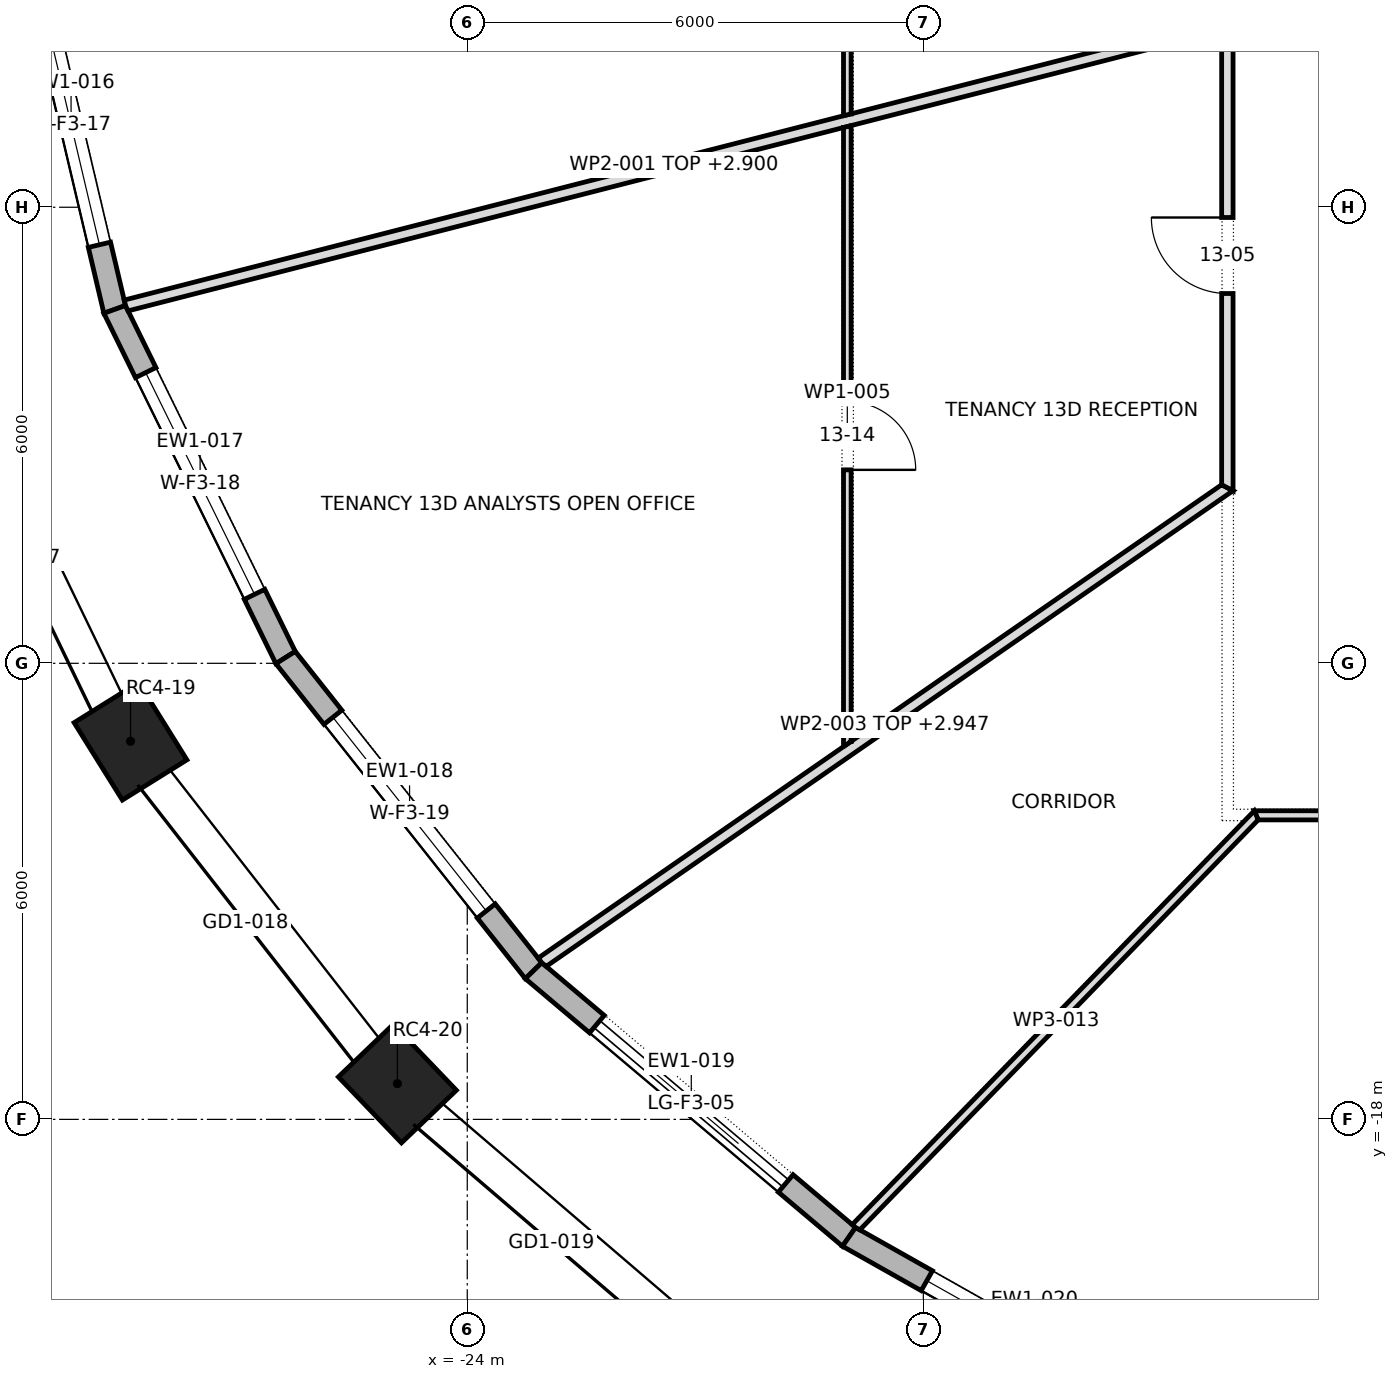
"""IFC4 building model, lengths in metres.
Left out: names, types, materials, properties, quantities, classifications, styles, units other than length and angle.
Written with IfcOpenShell. Run it as: python <this file> out.ifc"""

import sys

from ifc_helpers import new_model, si_unit, direction, frame, frame_2d, origin, origin_2d, place, context, subcontext, project, spatial, polyline, rectangle, outline, extrude, element, fill, save


model = new_model("IFC4")
c1 = context("Model", 3, precision=1e-05, world=origin(), true_north=direction((0.0, 1.0)))
c2 = subcontext(c1, "Body", "Model", "MODEL_VIEW")
j1 = project(units=[si_unit("LENGTHUNIT", "METRE"), si_unit("PLANEANGLEUNIT", "RADIAN")], contexts=[c1])
p1 = place(None, origin())
s1 = spatial("IfcSite", under=j1, at=p1, CompositionType="ELEMENT")
p2 = place(p1, origin())
s2 = spatial("IfcBuilding", under=s1, at=p2, CompositionType="ELEMENT")
p3 = place(p2, frame((0.0, 0.0, 198.9)))
s3 = spatial("IfcBuildingStorey", under=s2, at=p3, CompositionType="ELEMENT", Elevation=198.9)
for number, where, z_axis, x_axis in (
    (1, (-28.43, -13.025, 0.0), (0.0, 0.0, 1.0), (0.529, -0.849, 0.0)),
    (2, (-24.919, -17.529, 0.0), (0.0, 0.0, 1.0), (0.692, -0.722, 0.0)),
):
    element("IfcColumn", number, at=place(p3, frame(where, z_axis=z_axis, x_axis=x_axis)), inside=s3, PredefinedType="COLUMN", context=c2, shape_type="SweptSolid", body=[
        extrude(rectangle(XDim=1.2, YDim=1.0, at=origin_2d()), origin(), (0.0, 0.0, 1.0), 4.0),
    ])
p4 = place(p3, frame((-29.785, -2.48, 0.0), z_axis=(0.0, 0.0, 1.0), x_axis=(0.229455912692, -0.97331905567, 0.0)))
e3 = element("IfcWall", 3, at=p4, inside=s3, PredefinedType="STANDARD", context=c2, shape_type="SweptSolid", body=[
    extrude(outline(polyline([(-0.017, -0.15), (5.014, -0.15), (4.981, 0.15), (0.017, 0.15), (-0.017, -0.15)])), origin(), (0.0, 0.0, 1.0), 3.7),
])
p5 = place(p4, frame((0.874, 0.0, 0.6)))
e4 = element("IfcOpeningElement", 4, at=p5, cuts=e3, PredefinedType="OPENING", context=c2, shape_type="SweptSolid", body=[
    extrude(rectangle(XDim=3.25, YDim=2.65, at=frame_2d((1.625, 1.325))), frame((0.0, 0.162, 0.0), z_axis=(0.0, -1.0, 0.0), x_axis=(1.0, 0.0, 0.0)), (0.0, 0.0, 1.0), 0.324),
])
p6 = place(p3, frame((-28.639, -7.344, 0.0), z_axis=(0.0, 0.0, 1.0), x_axis=(0.440694221881, -0.897657285829, 0.0)))
e5 = element("IfcWall", 5, at=p6, inside=s3, PredefinedType="STANDARD", context=c2, shape_type="SweptSolid", body=[
    extrude(outline(polyline([(-0.017, -0.15), (5.118, -0.15), (5.086, 0.15), (0.017, 0.15), (-0.017, -0.15)])), origin(), (0.0, 0.0, 1.0), 3.7),
])
p7 = place(p6, frame((0.926, 0.0, 0.6)))
e6 = element("IfcOpeningElement", 6, at=p7, cuts=e5, PredefinedType="OPENING", context=c2, shape_type="SweptSolid", body=[
    extrude(rectangle(XDim=3.25, YDim=2.65, at=frame_2d((1.625, 1.325))), frame((0.0, 0.162, 0.0), z_axis=(0.0, -1.0, 0.0), x_axis=(1.0, 0.0, 0.0)), (0.0, 0.0, 1.0), 0.324),
])
p8 = place(p3, frame((-26.39, -11.924, 0.0), z_axis=(0.0, 0.0, 1.0), x_axis=(0.620829074232, -0.783945955145, 0.0)))
e7 = element("IfcWall", 7, at=p8, inside=s3, PredefinedType="STANDARD", context=c2, shape_type="SweptSolid", body=[
    extrude(outline(polyline([(-0.016, -0.15), (5.27, -0.15), (5.24, 0.15), (0.016, 0.15), (-0.016, -0.15)])), origin(), (0.0, 0.0, 1.0), 3.7),
])
p9 = place(p8, frame((1.003, 0.0, 0.6)))
e8 = element("IfcOpeningElement", 8, at=p9, cuts=e7, PredefinedType="OPENING", context=c2, shape_type="SweptSolid", body=[
    extrude(rectangle(XDim=3.25, YDim=2.65, at=frame_2d((1.625, 1.325))), frame((0.0, 0.162, 0.0), z_axis=(0.0, -1.0, 0.0), x_axis=(1.0, 0.0, 0.0)), (0.0, 0.0, 1.0), 0.324),
])
p10 = place(p3, frame((-23.128, -16.044, 0.0), z_axis=(0.0, 0.0, 1.0), x_axis=(0.764330261608, -0.644824977176, 0.0)))
e9 = element("IfcWall", 9, at=p10, inside=s3, PredefinedType="STANDARD", context=c2, shape_type="SweptSolid", body=[
    extrude(outline(polyline([(-0.015, -0.15), (5.444, -0.15), (5.416, 0.15), (0.015, 0.15), (-0.015, -0.15)])), origin(), (0.0, 0.0, 1.0), 3.7),
])
p11 = place(p10, frame((1.09, 0.0, 0.0)))
e10 = element("IfcOpeningElement", 10, at=p11, cuts=e9, PredefinedType="OPENING", context=c2, shape_type="SweptSolid", body=[
    extrude(rectangle(XDim=3.25, YDim=3.25, at=frame_2d((1.625, 1.625))), frame((0.0, 0.162, 0.0), z_axis=(0.0, -1.0, 0.0), x_axis=(1.0, 0.0, 0.0)), (0.0, 0.0, 1.0), 0.324),
])
p12 = place(p3, frame((-18.977, -19.545, 0.0), z_axis=(0.0, 0.0, 1.0), x_axis=(0.871083701819, -0.491134588912, 0.0)))
e11 = element("IfcWall", 11, at=p12, inside=s3, PredefinedType="STANDARD", context=c2, shape_type="SweptSolid", body=[
    extrude(outline(polyline([(-0.014, -0.15), (5.613, -0.15), (5.586, 0.15), (0.014, 0.15), (-0.014, -0.15)])), origin(), (0.0, 0.0, 1.0), 3.7),
])
p13 = place(p12, frame((1.175, 0.0, 0.6)))
e12 = element("IfcOpeningElement", 12, at=p13, cuts=e11, PredefinedType="OPENING", context=c2, shape_type="SweptSolid", body=[
    extrude(rectangle(XDim=3.25, YDim=2.65, at=frame_2d((1.625, 1.325))), frame((0.0, 0.162, 0.0), z_axis=(0.0, -1.0, 0.0), x_axis=(1.0, 0.0, 0.0)), (0.0, 0.0, 1.0), 0.324),
])
p14 = place(p3, frame((-28.494, -7.294, 0.0), z_axis=(0.0, 0.0, 1.0), x_axis=(0.96870063855, 0.248231893342, 0.0)))
e13 = element("IfcWall", 13, at=p14, inside=s3, PredefinedType="PARTITIONING", context=c2, shape_type="SweptSolid", body=[
    extrude(outline(polyline([(0.014, -0.075), (1.957, -0.075), (3.901, -0.075), (5.844, -0.075), (7.787, -0.075), (9.73, -0.075), (9.731, -0.073), (9.736, -0.075), (11.446, -0.075), (13.156, -0.075), (14.866, -0.075), (14.904, 0.074), (14.904, 0.075), (13.227, 0.075), (11.549, 0.075), (9.872, 0.075), (9.872, 0.073), (9.866, 0.075), (7.893, 0.075), (5.92, 0.075), (3.947, 0.075), (1.973, 0.075), (0.0, 0.075), (0.0, -0.008), (0.014, -0.075)])), origin(), (0.0, 0.0, 1.0), 2.9),
])
p15 = place(p3, frame((-23.024, -15.94, 0.0), z_axis=(0.0, 0.0, 1.0), x_axis=(0.822097241007, 0.569347105313, 0.0)))
e14 = element("IfcWall", 14, at=p15, inside=s3, PredefinedType="PARTITIONING", context=c2, shape_type="SweptSolid", body=[
    extrude(outline(polyline([(0.024, -0.075), (1.856, -0.075), (3.688, -0.075), (5.52, -0.075), (7.352, -0.075), (9.184, -0.075), (11.016, -0.075), (10.977, -0.0), (10.938, 0.075), (8.961, 0.075), (6.985, 0.075), (5.008, 0.075), (5.006, 0.072), (5.002, 0.075), (3.335, 0.075), (1.667, 0.075), (0.0, 0.075), (0.0, 0.068), (0.005, -0.002), (0.024, -0.075)])), origin(), (0.0, 0.0, 1.0), 2.947),
])
p16 = place(p3, frame((-19.0, -13.095, 0.0), z_axis=(0.0, 0.0, 1.0), x_axis=(0.0, 1.0, 0.0)))
e15 = element("IfcWall", 15, at=p16, inside=s3, PredefinedType="PARTITIONING", context=c2, shape_type="SweptSolid", body=[
    extrude(outline(polyline([(8.169, -0.05), (8.169, -0.049), (8.144, 0.05), (6.515, 0.05), (4.886, 0.05), (3.258, 0.05), (1.629, 0.05), (0.0, 0.05), (0.0, 0.049), (0.069, -0.05), (1.689, -0.05), (3.309, -0.05), (4.929, -0.05), (6.549, -0.05), (8.169, -0.05)])), origin(), (0.0, 0.0, 1.0), 3.7),
])
p17 = place(p16, frame((3.64, 0.0, 0.0)))
e16 = element("IfcOpeningElement", 16, at=p17, cuts=e15, PredefinedType="OPENING", context=c2, shape_type="SweptSolid", body=[
    extrude(rectangle(XDim=0.9, YDim=2.1, at=frame_2d((0.45, 1.05))), frame((0.0, 0.062, 0.0), z_axis=(0.0, -1.0, 0.0), x_axis=(1.0, 0.0, 0.0)), (0.0, 0.0, 1.0), 0.124),
])
p18 = place(p3, frame((-19.0, -4.796, 0.0), z_axis=(0.0, 0.0, 1.0), x_axis=(0.0, 1.0, 0.0)))
e17 = element("IfcWall", 17, at=p18, inside=s3, PredefinedType="PARTITIONING", context=c2, shape_type="SweptSolid", body=[
    extrude(outline(polyline([(0.025, -0.05), (1.934, -0.05), (3.842, -0.05), (5.75, -0.05), (7.659, -0.05), (9.567, -0.05), (9.593, 0.049), (9.593, 0.05), (7.674, 0.05), (5.756, 0.05), (3.837, 0.05), (1.918, 0.05), (0.0, 0.05), (0.0, 0.049), (0.025, -0.05)])), origin(), (0.0, 0.0, 1.0), 3.7),
])
p19 = place(p18, frame((4.346, 0.0, 0.0)))
e18 = element("IfcOpeningElement", 18, at=p19, cuts=e17, PredefinedType="OPENING", context=c2, shape_type="SweptSolid", body=[
    extrude(rectangle(XDim=0.9, YDim=2.1, at=frame_2d((0.45, 1.05))), frame((0.0, 0.062, 0.0), z_axis=(0.0, -1.0, 0.0), x_axis=(1.0, 0.0, 0.0)), (0.0, 0.0, 1.0), 0.124),
])
p20 = place(p3, frame((-13.646, -14.0, 0.0), z_axis=(0.0, 0.0, 1.0), x_axis=(1.0, 0.0, 0.0)))
e19 = element("IfcWall", 19, at=p20, inside=s3, PredefinedType="PARTITIONING", context=c2, shape_type="SweptSolid", body=[
    extrude(outline(polyline([(12.016, 0.06), (10.299, 0.06), (8.583, 0.06), (6.866, 0.06), (5.15, 0.06), (3.433, 0.06), (1.717, 0.06), (0.0, 0.06), (0.051, -0.06), (2.045, -0.06), (4.039, -0.06), (6.033, -0.06), (8.027, -0.06), (10.021, -0.06), (12.016, -0.06), (12.016, 0.06)])), origin(), (0.0, 0.0, 1.0), 3.7),
])
p21 = place(p20, frame((5.521, 0.0, 0.0)))
e20 = element("IfcOpeningElement", 20, at=p21, cuts=e19, PredefinedType="OPENING", context=c2, shape_type="SweptSolid", body=[
    extrude(rectangle(XDim=1.0, YDim=2.1, at=frame_2d((0.5, 1.05))), frame((0.0, 0.072, 0.0), z_axis=(0.0, -1.0, 0.0), x_axis=(1.0, 0.0, 0.0)), (0.0, 0.0, 1.0), 0.144),
])
p22 = place(p3, frame((-14.0, -9.729, 0.0), z_axis=(0.0, 0.0, 1.0), x_axis=(0.0, 1.0, 0.0)))
e21 = element("IfcWall", 21, at=p22, inside=s3, PredefinedType="PARTITIONING", context=c2, shape_type="SweptSolid", body=[
    extrude(outline(polyline([(19.458, -0.075), (19.458, -0.075), (19.38, 0.075), (17.45, 0.075), (15.52, 0.075), (13.59, 0.075), (11.659, 0.075), (9.729, 0.075), (7.799, 0.075), (5.869, 0.075), (3.939, 0.075), (2.009, 0.075), (0.079, 0.075), (0.0, -0.075), (0.0, -0.075), (1.946, -0.075), (3.892, -0.075), (5.838, -0.075), (7.783, -0.075), (9.729, -0.075), (11.675, -0.075), (13.621, -0.075), (15.567, -0.075), (17.513, -0.075), (19.458, -0.075)])), origin(), (0.0, 0.0, 1.0), 3.7),
])
p23 = place(p22, frame((15.864, 0.0, 0.0)))
e22 = element("IfcOpeningElement", 22, at=p23, cuts=e21, PredefinedType="OPENING", context=c2, shape_type="SweptSolid", body=[
    extrude(rectangle(XDim=1.0, YDim=2.1, at=frame_2d((0.5, 1.05))), frame((0.0, 0.087, 0.0), z_axis=(0.0, -1.0, 0.0), x_axis=(1.0, 0.0, 0.0)), (0.0, 0.0, 1.0), 0.174),
])
p24 = place(p22, frame((9.229, 0.0, 0.0)))
e23 = element("IfcOpeningElement", 23, at=p24, cuts=e21, PredefinedType="OPENING", context=c2, shape_type="SweptSolid", body=[
    extrude(rectangle(XDim=1.0, YDim=2.1, at=frame_2d((0.5, 1.05))), frame((0.0, 0.087, 0.0), z_axis=(0.0, -1.0, 0.0), x_axis=(1.0, 0.0, 0.0)), (0.0, 0.0, 1.0), 0.174),
])
p25 = place(p22, frame((2.594, 0.0, 0.0)))
e24 = element("IfcOpeningElement", 24, at=p25, cuts=e21, PredefinedType="OPENING", context=c2, shape_type="SweptSolid", body=[
    extrude(rectangle(XDim=1.0, YDim=2.1, at=frame_2d((0.5, 1.05))), frame((0.0, 0.087, 0.0), z_axis=(0.0, -1.0, 0.0), x_axis=(1.0, 0.0, 0.0)), (0.0, 0.0, 1.0), 0.174),
])
p26 = place(p3, frame((-13.602, -13.982, 0.0), z_axis=(0.0, 0.0, 1.0), x_axis=(-0.69685470262, -0.717212328001, 0.0)))
e25 = element("IfcWall", 25, at=p26, inside=s3, PredefinedType="PARTITIONING", context=c2, shape_type="SweptSolid", body=[
    extrude(outline(polyline([(7.591, -0.06), (7.591, -0.058), (7.587, -0.003), (7.571, 0.06), (5.691, 0.06), (3.811, 0.06), (1.931, 0.06), (0.051, 0.06), (0.025, 0.0), (0.0, -0.06), (0.0, -0.06), (0.0, -0.06), (1.898, -0.06), (3.796, -0.06), (5.694, -0.06), (7.591, -0.06)])), origin(), (0.0, 0.0, 1.0), 3.7),
])
p27 = place(p5, origin())
e26 = element("IfcWindow", 26, at=p27, inside=s3, PartitioningType="TRIPLE_PANEL_VERTICAL", PredefinedType="WINDOW", context=c2, shape_type="SweptSolid", body=[
    extrude(rectangle(XDim=3.25, YDim=2.65, at=frame_2d((1.625, 1.325))), frame((0.0, 0.03, 0.0), z_axis=(0.0, -1.0, 0.0), x_axis=(1.0, 0.0, 0.0)), (0.0, 0.0, 1.0), 0.06),
])
fill(e4, e26)
p28 = place(p7, origin())
e27 = element("IfcWindow", 27, at=p28, inside=s3, PartitioningType="TRIPLE_PANEL_VERTICAL", PredefinedType="WINDOW", context=c2, shape_type="SweptSolid", body=[
    extrude(rectangle(XDim=3.25, YDim=2.65, at=frame_2d((1.625, 1.325))), frame((0.0, 0.03, 0.0), z_axis=(0.0, -1.0, 0.0), x_axis=(1.0, 0.0, 0.0)), (0.0, 0.0, 1.0), 0.06),
])
fill(e6, e27)
p29 = place(p9, origin())
e28 = element("IfcWindow", 28, at=p29, inside=s3, PartitioningType="TRIPLE_PANEL_VERTICAL", PredefinedType="WINDOW", context=c2, shape_type="SweptSolid", body=[
    extrude(rectangle(XDim=3.25, YDim=2.65, at=frame_2d((1.625, 1.325))), frame((0.0, 0.03, 0.0), z_axis=(0.0, -1.0, 0.0), x_axis=(1.0, 0.0, 0.0)), (0.0, 0.0, 1.0), 0.06),
])
fill(e8, e28)
p30 = place(p11, origin())
e29 = element("IfcDoor", 29, at=p30, inside=s3, OperationType="DOUBLE_DOOR_SLIDING", PredefinedType="DOOR", context=c2, shape_type="SweptSolid", body=[
    extrude(rectangle(XDim=3.25, YDim=3.25, at=frame_2d((1.625, 1.625))), frame((0.0, 0.025, 0.0), z_axis=(0.0, -1.0, 0.0), x_axis=(1.0, 0.0, 0.0)), (0.0, 0.0, 1.0), 0.05),
])
fill(e10, e29)
p31 = place(p13, origin())
e30 = element("IfcWindow", 30, at=p31, inside=s3, PartitioningType="TRIPLE_PANEL_VERTICAL", PredefinedType="WINDOW", context=c2, shape_type="SweptSolid", body=[
    extrude(rectangle(XDim=3.25, YDim=2.65, at=frame_2d((1.625, 1.325))), frame((0.0, 0.03, 0.0), z_axis=(0.0, -1.0, 0.0), x_axis=(1.0, 0.0, 0.0)), (0.0, 0.0, 1.0), 0.06),
])
fill(e12, e30)
p32 = place(p25, origin())
e31 = element("IfcDoor", 31, at=p32, inside=s3, OperationType="SINGLE_SWING_LEFT", PredefinedType="DOOR", context=c2, shape_type="SweptSolid", body=[
    extrude(rectangle(XDim=1.0, YDim=2.1, at=frame_2d((0.5, 1.05))), frame((0.0, 0.025, 0.0), z_axis=(0.0, -1.0, 0.0), x_axis=(1.0, 0.0, 0.0)), (0.0, 0.0, 1.0), 0.05),
])
fill(e24, e31)
p33 = place(p17, frame((0.9, 0.0, 0.0), z_axis=(0.0, 0.0, 1.0), x_axis=(-1.0, 0.0, 0.0)))
e32 = element("IfcDoor", 32, at=p33, inside=s3, OperationType="SINGLE_SWING_LEFT", PredefinedType="DOOR", context=c2, shape_type="SweptSolid", body=[
    extrude(rectangle(XDim=0.9, YDim=2.1, at=frame_2d((0.45, 1.05))), frame((0.0, 0.025, 0.0), z_axis=(0.0, -1.0, 0.0), x_axis=(1.0, 0.0, 0.0)), (0.0, 0.0, 1.0), 0.05),
])
fill(e16, e32)
save(model, sys.argv[1])
